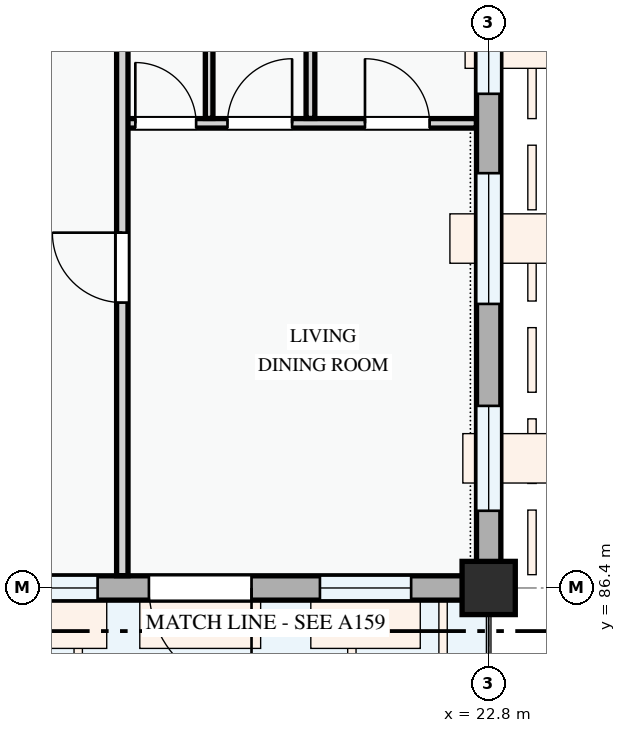
"""IFC4 building model, lengths in metres.
Left out: names, types, materials, properties, quantities, classifications, styles, units other than length and angle.
Written with IfcOpenShell. Run it as: python <this file> out.ifc"""

import sys

from ifc_helpers import new_model, si_unit, direction, frame, frame_2d, origin, origin_2d, place, context, subcontext, project, spatial, rectangle, extrude, element, fill, save


model = new_model("IFC4")
c1 = context("Model", 3, precision=1e-05, world=origin(), true_north=direction((0.0, 1.0)))
c2 = subcontext(c1, "Body", "Model", "MODEL_VIEW")
j1 = project(units=[si_unit("LENGTHUNIT", "METRE"), si_unit("PLANEANGLEUNIT", "RADIAN")], contexts=[c1])
p1 = place(None, origin())
s1 = spatial("IfcSite", under=j1, at=p1, CompositionType="ELEMENT")
p2 = place(p1, origin())
s2 = spatial("IfcBuilding", under=s1, at=p2, CompositionType="ELEMENT")
p3 = place(p2, frame((0.0, 0.0, 21.3)))
s3 = spatial("IfcBuildingStorey", under=s2, at=p3, CompositionType="ELEMENT", Elevation=21.3)
p4 = place(p3, frame((22.8, 86.4, 0.0), z_axis=(0.0, 0.0, 1.0), x_axis=(1.0, 0.0, 0.0)))
e1 = element("IfcColumn", 1, at=p4, inside=s3, PredefinedType="COLUMN", context=c2, shape_type="SweptSolid", body=[
    extrude(rectangle(XDim=0.7, YDim=0.7, at=origin_2d()), origin(), (0.0, 0.0, 1.0), 3.3),
])
p5 = place(p3, frame((14.4, 86.4, 0.0), z_axis=(0.0, 0.0, 1.0), x_axis=(1.0, 0.0, 0.0)))
e2 = element("IfcWall", 2, at=p5, inside=s3, PredefinedType="STANDARD", context=c2, shape_type="SweptSolid", body=[
    extrude(rectangle(XDim=8.4, YDim=0.32, at=frame_2d((4.2, 0.0))), origin(), (0.0, 0.0, 1.0), 2.375),
])
p6 = place(p5, frame((3.93, 0.0, 0.0)))
e3 = element("IfcOpeningElement", 3, at=p6, cuts=e2, PredefinedType="OPENING", context=c2, shape_type="SweptSolid", body=[
    extrude(rectangle(XDim=1.35, YDim=2.2, at=frame_2d((0.675, 1.1))), frame((0.0, 0.17, 0.0), z_axis=(0.0, -1.0, 0.0), x_axis=(1.0, 0.0, 0.0)), (0.0, 0.0, 1.0), 0.34),
])
p7 = place(p5, frame((6.18, 0.0, 0.78)))
e4 = element("IfcOpeningElement", 4, at=p7, cuts=e2, PredefinedType="OPENING", context=c2, shape_type="SweptSolid", body=[
    extrude(rectangle(XDim=1.2, YDim=1.35, at=frame_2d((0.6, 0.675))), frame((0.0, 0.17, 0.0), z_axis=(0.0, -1.0, 0.0), x_axis=(1.0, 0.0, 0.0)), (0.0, 0.0, 1.0), 0.34),
])
p8 = place(p5, frame((0.485, 0.0, 0.78)))
e5 = element("IfcOpeningElement", 5, at=p8, cuts=e2, PredefinedType="OPENING", context=c2, shape_type="SweptSolid", body=[
    extrude(rectangle(XDim=0.9, YDim=1.2, at=frame_2d((0.45, 0.6))), frame((0.0, 0.17, 0.0), z_axis=(0.0, -1.0, 0.0), x_axis=(1.0, 0.0, 0.0)), (0.0, 0.0, 1.0), 0.34),
])
p9 = place(p5, frame((2.005, 0.0, 0.78)))
e6 = element("IfcOpeningElement", 6, at=p9, cuts=e2, PredefinedType="OPENING", context=c2, shape_type="SweptSolid", body=[
    extrude(rectangle(XDim=1.25, YDim=1.45, at=frame_2d((0.625, 0.725))), frame((0.0, 0.17, 0.0), z_axis=(0.0, -1.0, 0.0), x_axis=(1.0, 0.0, 0.0)), (0.0, 0.0, 1.0), 0.34),
])
p10 = place(p3, frame((22.8, 86.4, 0.0), z_axis=(0.0, 0.0, 1.0), x_axis=(0.0, 1.0, 0.0)))
e7 = element("IfcWall", 7, at=p10, inside=s3, PredefinedType="STANDARD", context=c2, shape_type="SweptSolid", body=[
    extrude(rectangle(XDim=8.4, YDim=0.32, at=frame_2d((4.2, 0.0))), origin(), (0.0, 0.0, 1.0), 2.425),
])
p11 = place(p10, frame((1.016, 0.0, 0.78)))
e8 = element("IfcOpeningElement", 8, at=p11, cuts=e7, PredefinedType="OPENING", context=c2, shape_type="SweptSolid", body=[
    extrude(rectangle(XDim=1.38, YDim=1.48, at=frame_2d((0.69, 0.74))), frame((0.0, 0.17, 0.0), z_axis=(0.0, -1.0, 0.0), x_axis=(1.0, 0.0, 0.0)), (0.0, 0.0, 1.0), 0.34),
])
p12 = place(p10, frame((3.737, 0.0, 0.78)))
e9 = element("IfcOpeningElement", 9, at=p12, cuts=e7, PredefinedType="OPENING", context=c2, shape_type="SweptSolid", body=[
    extrude(rectangle(XDim=1.72, YDim=1.52, at=frame_2d((0.86, 0.76))), frame((0.0, 0.17, 0.0), z_axis=(0.0, -1.0, 0.0), x_axis=(1.0, 0.0, 0.0)), (0.0, 0.0, 1.0), 0.34),
])
p13 = place(p10, frame((6.501, 0.0, 0.78)))
e10 = element("IfcOpeningElement", 10, at=p13, cuts=e7, PredefinedType="OPENING", context=c2, shape_type="SweptSolid", body=[
    extrude(rectangle(XDim=1.32, YDim=1.35, at=frame_2d((0.66, 0.675))), frame((0.0, 0.17, 0.0), z_axis=(0.0, -1.0, 0.0), x_axis=(1.0, 0.0, 0.0)), (0.0, 0.0, 1.0), 0.34),
])
p14 = place(p3, frame((17.98, 92.513, 0.0), z_axis=(0.0, 0.0, 1.0), x_axis=(1.0, 0.0, 0.0)))
e11 = element("IfcWall", 11, at=p14, inside=s3, PredefinedType="PARTITIONING", context=c2, shape_type="SweptSolid", body=[
    extrude(rectangle(XDim=4.658, YDim=0.125, at=frame_2d((2.329, 0.0))), origin(), (0.0, 0.0, 1.0), 3.0),
])
p15 = place(p14, frame((0.171, 0.0, 0.0)))
e12 = element("IfcOpeningElement", 12, at=p15, cuts=e11, PredefinedType="OPENING", context=c2, shape_type="SweptSolid", body=[
    extrude(rectangle(XDim=0.8, YDim=2.1, at=frame_2d((0.4, 1.05))), frame((0.0, 0.073, 0.0), z_axis=(0.0, -1.0, 0.0), x_axis=(1.0, 0.0, 0.0)), (0.0, 0.0, 1.0), 0.145),
])
p16 = place(p14, frame((1.384, 0.0, 0.0)))
e13 = element("IfcOpeningElement", 13, at=p16, cuts=e11, PredefinedType="OPENING", context=c2, shape_type="SweptSolid", body=[
    extrude(rectangle(XDim=0.85, YDim=2.1, at=frame_2d((0.425, 1.05))), frame((0.0, 0.073, 0.0), z_axis=(0.0, -1.0, 0.0), x_axis=(1.0, 0.0, 0.0)), (0.0, 0.0, 1.0), 0.145),
])
p17 = place(p14, frame((3.193, 0.0, 0.0)))
e14 = element("IfcOpeningElement", 14, at=p17, cuts=e11, PredefinedType="OPENING", context=c2, shape_type="SweptSolid", body=[
    extrude(rectangle(XDim=0.85, YDim=2.1, at=frame_2d((0.425, 1.05))), frame((0.0, 0.073, 0.0), z_axis=(0.0, -1.0, 0.0), x_axis=(1.0, 0.0, 0.0)), (0.0, 0.0, 1.0), 0.145),
])
p18 = place(p3, frame((20.455, 92.577, 0.0), z_axis=(0.0, 0.0, 1.0), x_axis=(0.0, 1.0, 0.0)))
e15 = element("IfcWall", 15, at=p18, inside=s3, PredefinedType="PARTITIONING", context=c2, shape_type="SweptSolid", body=[
    extrude(rectangle(XDim=6.398, YDim=0.115, at=frame_2d((3.199, 0.0))), origin(), (0.0, 0.0, 1.0), 3.0),
])
p19 = place(p3, frame((19.122, 92.577, 0.0), z_axis=(0.0, 0.0, 1.0), x_axis=(0.0, 1.0, 0.0)))
e16 = element("IfcWall", 16, at=p19, inside=s3, PredefinedType="PARTITIONING", context=c2, shape_type="SweptSolid", body=[
    extrude(rectangle(XDim=6.398, YDim=0.1, at=frame_2d((3.199, 0.0))), origin(), (0.0, 0.0, 1.0), 3.0),
])
p20 = place(p3, frame((17.98, 86.562, 0.0), z_axis=(0.0, 0.0, 1.0), x_axis=(0.0, 1.0, 0.0)))
e17 = element("IfcWall", 17, at=p20, inside=s3, PredefinedType="PARTITIONING", context=c2, shape_type="SweptSolid", body=[
    extrude(rectangle(XDim=22.778, YDim=0.15, at=frame_2d((11.389, 0.0))), origin(), (0.0, 0.0, 1.0), 3.0),
])
p21 = place(p20, frame((3.593, 0.0, 0.0)))
e18 = element("IfcOpeningElement", 18, at=p21, cuts=e17, PredefinedType="OPENING", context=c2, shape_type="SweptSolid", body=[
    extrude(rectangle(XDim=0.92, YDim=2.1, at=frame_2d((0.46, 1.05))), frame((0.0, 0.085, 0.0), z_axis=(0.0, -1.0, 0.0), x_axis=(1.0, 0.0, 0.0)), (0.0, 0.0, 1.0), 0.17),
])
p22 = place(p20, frame((16.228, 0.0, 0.0)))
e19 = element("IfcOpeningElement", 19, at=p22, cuts=e17, PredefinedType="OPENING", context=c2, shape_type="SweptSolid", body=[
    extrude(rectangle(XDim=0.92, YDim=2.1, at=frame_2d((0.46, 1.05))), frame((0.0, 0.085, 0.0), z_axis=(0.0, -1.0, 0.0), x_axis=(1.0, 0.0, 0.0)), (0.0, 0.0, 1.0), 0.17),
])
p23 = place(p6, frame((1.35, 0.0, 0.0), z_axis=(0.0, 0.0, 1.0), x_axis=(-1.0, 0.0, 0.0)))
e20 = element("IfcDoor", 20, at=p23, inside=s3, OperationType="SINGLE_SWING_LEFT", PredefinedType="DOOR", context=c2, shape_type="SweptSolid", body=[
    extrude(rectangle(XDim=1.35, YDim=2.2, at=frame_2d((0.675, 1.1))), frame((0.0, 0.025, 0.0), z_axis=(0.0, -1.0, 0.0), x_axis=(1.0, 0.0, 0.0)), (0.0, 0.0, 1.0), 0.05),
])
fill(e3, e20)
p24 = place(p7, origin())
e21 = element("IfcWindow", 21, at=p24, inside=s3, PartitioningType="SINGLE_PANEL", PredefinedType="WINDOW", context=c2, shape_type="SweptSolid", body=[
    extrude(rectangle(XDim=1.2, YDim=1.35, at=frame_2d((0.6, 0.675))), frame((0.0, 0.03, 0.0), z_axis=(0.0, -1.0, 0.0), x_axis=(1.0, 0.0, 0.0)), (0.0, 0.0, 1.0), 0.06),
])
fill(e4, e21)
p25 = place(p9, origin())
e22 = element("IfcWindow", 22, at=p25, inside=s3, PartitioningType="SINGLE_PANEL", PredefinedType="WINDOW", context=c2, shape_type="SweptSolid", body=[
    extrude(rectangle(XDim=1.25, YDim=1.45, at=frame_2d((0.625, 0.725))), frame((0.0, 0.03, 0.0), z_axis=(0.0, -1.0, 0.0), x_axis=(1.0, 0.0, 0.0)), (0.0, 0.0, 1.0), 0.06),
])
fill(e6, e22)
p26 = place(p11, origin())
e23 = element("IfcWindow", 23, at=p26, inside=s3, PartitioningType="SINGLE_PANEL", PredefinedType="WINDOW", context=c2, shape_type="SweptSolid", body=[
    extrude(rectangle(XDim=1.38, YDim=1.48, at=frame_2d((0.69, 0.74))), frame((0.0, 0.03, 0.0), z_axis=(0.0, -1.0, 0.0), x_axis=(1.0, 0.0, 0.0)), (0.0, 0.0, 1.0), 0.06),
])
fill(e8, e23)
p27 = place(p12, origin())
e24 = element("IfcWindow", 24, at=p27, inside=s3, PartitioningType="DOUBLE_PANEL_VERTICAL", PredefinedType="WINDOW", context=c2, shape_type="SweptSolid", body=[
    extrude(rectangle(XDim=1.72, YDim=1.52, at=frame_2d((0.86, 0.76))), frame((0.0, 0.03, 0.0), z_axis=(0.0, -1.0, 0.0), x_axis=(1.0, 0.0, 0.0)), (0.0, 0.0, 1.0), 0.06),
])
fill(e9, e24)
p28 = place(p13, origin())
e25 = element("IfcWindow", 25, at=p28, inside=s3, PartitioningType="SINGLE_PANEL", PredefinedType="WINDOW", context=c2, shape_type="SweptSolid", body=[
    extrude(rectangle(XDim=1.32, YDim=1.35, at=frame_2d((0.66, 0.675))), frame((0.0, 0.03, 0.0), z_axis=(0.0, -1.0, 0.0), x_axis=(1.0, 0.0, 0.0)), (0.0, 0.0, 1.0), 0.06),
])
fill(e10, e25)
p29 = place(p15, origin())
e26 = element("IfcDoor", 26, at=p29, inside=s3, OperationType="SINGLE_SWING_LEFT", PredefinedType="DOOR", context=c2, shape_type="SweptSolid", body=[
    extrude(rectangle(XDim=0.8, YDim=2.1, at=frame_2d((0.4, 1.05))), frame((0.0, 0.025, 0.0), z_axis=(0.0, -1.0, 0.0), x_axis=(1.0, 0.0, 0.0)), (0.0, 0.0, 1.0), 0.05),
])
fill(e12, e26)
p30 = place(p16, origin())
e27 = element("IfcDoor", 27, at=p30, inside=s3, OperationType="SINGLE_SWING_RIGHT", PredefinedType="DOOR", context=c2, shape_type="SweptSolid", body=[
    extrude(rectangle(XDim=0.85, YDim=2.1, at=frame_2d((0.425, 1.05))), frame((0.0, 0.025, 0.0), z_axis=(0.0, -1.0, 0.0), x_axis=(1.0, 0.0, 0.0)), (0.0, 0.0, 1.0), 0.05),
])
fill(e13, e27)
p31 = place(p17, origin())
e28 = element("IfcDoor", 28, at=p31, inside=s3, OperationType="SINGLE_SWING_LEFT", PredefinedType="DOOR", context=c2, shape_type="SweptSolid", body=[
    extrude(rectangle(XDim=0.85, YDim=2.1, at=frame_2d((0.425, 1.05))), frame((0.0, 0.025, 0.0), z_axis=(0.0, -1.0, 0.0), x_axis=(1.0, 0.0, 0.0)), (0.0, 0.0, 1.0), 0.05),
])
fill(e14, e28)
p32 = place(p21, origin())
e29 = element("IfcDoor", 29, at=p32, inside=s3, OperationType="SINGLE_SWING_RIGHT", PredefinedType="DOOR", context=c2, shape_type="SweptSolid", body=[
    extrude(rectangle(XDim=0.92, YDim=2.1, at=frame_2d((0.46, 1.05))), frame((0.0, 0.025, 0.0), z_axis=(0.0, -1.0, 0.0), x_axis=(1.0, 0.0, 0.0)), (0.0, 0.0, 1.0), 0.05),
])
fill(e18, e29)
save(model, sys.argv[1])
